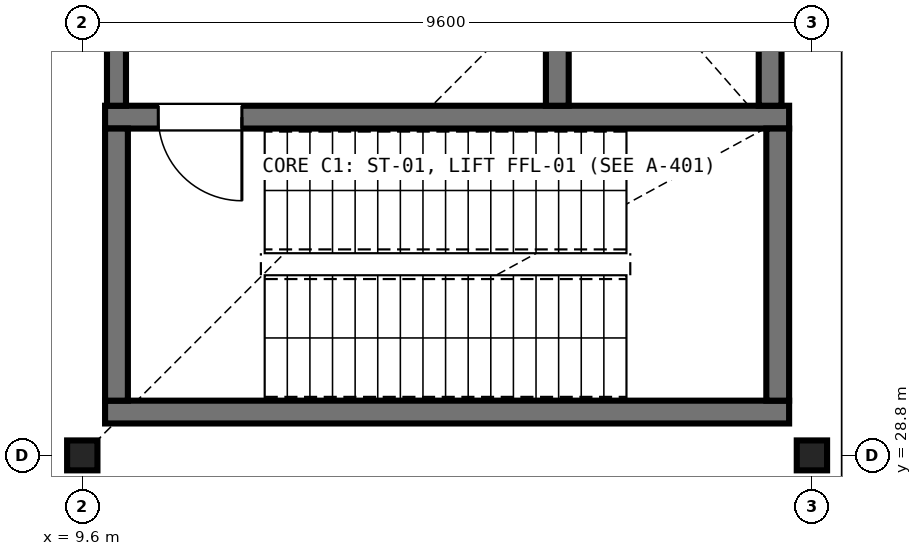
"""IFC4 building model, lengths in metres.
Left out: names, types, materials, properties, quantities, classifications, styles, units other than length and angle.
Written with IfcOpenShell. Run it as: python <this file> out.ifc"""

import sys

from ifc_helpers import new_model, si_unit, direction, frame, frame_2d, origin, origin_2d, place, context, subcontext, project, spatial, rectangle, i_section, extrude, element, fill, save


model = new_model("IFC4")
c1 = context("Model", 3, precision=1e-05, world=origin(), true_north=direction((0.0, 1.0)))
c2 = subcontext(c1, "Body", "Model", "MODEL_VIEW")
j1 = project(units=[si_unit("LENGTHUNIT", "METRE"), si_unit("PLANEANGLEUNIT", "RADIAN")], contexts=[c1])
p1 = place(None, origin())
s1 = spatial("IfcSite", under=j1, at=p1, CompositionType="ELEMENT")
p2 = place(p1, origin())
s2 = spatial("IfcBuilding", under=s1, at=p2, CompositionType="ELEMENT")
p3 = place(p2, origin())
s3 = spatial("IfcBuildingStorey", under=s2, at=p3, CompositionType="ELEMENT", Elevation=0.0)
for number, where, z_axis, x_axis in (
    (1, (9.6, 28.8, 0.0), (0.0, 0.0, 1.0), (1.0, 0.0, 0.0)),
    (2, (19.2, 28.8, 0.0), (0.0, 0.0, 1.0), (1.0, 0.0, 0.0)),
):
    element("IfcColumn", number, at=place(p3, frame(where, z_axis=z_axis, x_axis=x_axis)), inside=s3, PredefinedType="COLUMN", context=c2, shape_type="SweptSolid", body=[
        extrude(i_section(OverallWidth=0.399, OverallDepth=0.394, WebThickness=0.023, FlangeThickness=0.037, FilletRadius=0.015, at=origin_2d()), origin(), (0.0, 0.0, 1.0), 5.75),
    ])
p4 = place(p3, frame((9.9, 29.37, 0.0), z_axis=(0.0, 0.0, 1.0), x_axis=(1.0, 0.0, 0.0)))
e3 = element("IfcWall", 3, at=p4, inside=s3, PredefinedType="SHEAR", context=c2, shape_type="SweptSolid", body=[
    extrude(rectangle(XDim=9.0, YDim=0.3, at=frame_2d((4.5, 0.0))), origin(), (0.0, 0.0, 1.0), 5.75),
])
p5 = place(p3, frame((18.9, 33.25, 0.0), z_axis=(0.0, 0.0, 1.0), x_axis=(-1.0, 0.0, 0.0)))
e4 = element("IfcWall", 4, at=p5, inside=s3, PredefinedType="SHEAR", context=c2, shape_type="SweptSolid", body=[
    extrude(rectangle(XDim=9.0, YDim=0.3, at=frame_2d((4.5, 0.0))), origin(), (0.0, 0.0, 1.0), 5.75),
])
p6 = place(p5, frame((7.2, 0.0, 0.0)))
e5 = element("IfcOpeningElement", 5, at=p6, cuts=e4, PredefinedType="OPENING", context=c2, shape_type="SweptSolid", body=[
    extrude(rectangle(XDim=1.1, YDim=2.15, at=frame_2d((0.55, 1.075))), frame((0.0, 0.16, 0.0), z_axis=(0.0, -1.0, 0.0), x_axis=(1.0, 0.0, 0.0)), (0.0, 0.0, 1.0), 0.32),
])
for number, where, z_axis, x_axis in (
    (6, (10.05, 29.52, 0.0), (0.0, 0.0, 1.0), (0.0, 1.0, 0.0)),
    (7, (18.75, 33.1, 0.0), (0.0, 0.0, 1.0), (0.0, -1.0, 0.0)),
):
    element("IfcWall", number, at=place(p3, frame(where, z_axis=z_axis, x_axis=x_axis)), inside=s3, PredefinedType="SHEAR", context=c2, shape_type="SweptSolid", body=[
        extrude(rectangle(XDim=3.58, YDim=0.3, at=frame_2d((1.79, 0.0))), origin(), (0.0, 0.0, 1.0), 5.75),
    ])
p7 = place(p3, frame((15.85, 36.1, 0.0), z_axis=(0.0, 0.0, 1.0), x_axis=(0.0, -1.0, 0.0)))
e8 = element("IfcWall", 8, at=p7, inside=s3, PredefinedType="SHEAR", context=c2, shape_type="SweptSolid", body=[
    extrude(rectangle(XDim=2.7, YDim=0.3, at=frame_2d((1.35, 0.0))), origin(), (0.0, 0.0, 1.0), 5.75),
])
p8 = place(p7, frame((0.8, 0.0, 0.0)))
e9 = element("IfcOpeningElement", 9, at=p8, cuts=e8, PredefinedType="OPENING", context=c2, shape_type="SweptSolid", body=[
    extrude(rectangle(XDim=1.1, YDim=2.1, at=frame_2d((0.55, 1.05))), frame((0.0, 0.16, 0.0), z_axis=(0.0, -1.0, 0.0), x_axis=(1.0, 0.0, 0.0)), (0.0, 0.0, 1.0), 0.32),
])
p9 = place(p3, frame((18.65, 33.4, 0.0), z_axis=(0.0, 0.0, 1.0), x_axis=(0.0, 1.0, 0.0)))
e10 = element("IfcWall", 10, at=p9, inside=s3, PredefinedType="SHEAR", context=c2, shape_type="SweptSolid", body=[
    extrude(rectangle(XDim=2.7, YDim=0.3, at=frame_2d((1.35, 0.0))), origin(), (0.0, 0.0, 1.0), 5.75),
])
p10 = place(p3, frame((10.05, 33.4, 0.0), z_axis=(0.0, 0.0, 1.0), x_axis=(0.0, 1.0, 0.0)))
e11 = element("IfcWall", 11, at=p10, inside=s3, PredefinedType="SHEAR", context=c2, shape_type="SweptSolid", body=[
    extrude(rectangle(XDim=2.7, YDim=0.25, at=frame_2d((1.35, 0.0))), origin(), (0.0, 0.0, 1.0), 5.75),
])
p11 = place(p10, frame((0.75, 0.0, 0.0)))
e12 = element("IfcOpeningElement", 12, at=p11, cuts=e11, PredefinedType="OPENING", context=c2, shape_type="SweptSolid", body=[
    extrude(rectangle(XDim=1.2, YDim=2.15, at=frame_2d((0.6, 1.075))), frame((0.0, 0.135, 0.0), z_axis=(0.0, -1.0, 0.0), x_axis=(1.0, 0.0, 0.0)), (0.0, 0.0, 1.0), 0.27),
])
p12 = place(p3, frame((19.7, 12.6, 0.0), z_axis=(0.0, 0.0, 1.0), x_axis=(0.0, 1.0, 0.0)))
e13 = element("IfcWall", 13, at=p12, inside=s3, PredefinedType="PARTITIONING", context=c2, shape_type="SweptSolid", body=[
    extrude(rectangle(XDim=25.2, YDim=0.2, at=frame_2d((12.6, 0.0))), origin(), (0.0, 0.0, 1.0), 5.056),
])
p13 = place(p6, origin())
e14 = element("IfcDoor", 14, at=p13, inside=s3, OperationType="SINGLE_SWING_LEFT", PredefinedType="DOOR", context=c2, shape_type="SweptSolid", body=[
    extrude(rectangle(XDim=1.1, YDim=2.15, at=frame_2d((0.55, 1.075))), frame((0.0, 0.025, 0.0), z_axis=(0.0, -1.0, 0.0), x_axis=(1.0, 0.0, 0.0)), (0.0, 0.0, 1.0), 0.05),
])
fill(e5, e14)
save(model, sys.argv[1])
